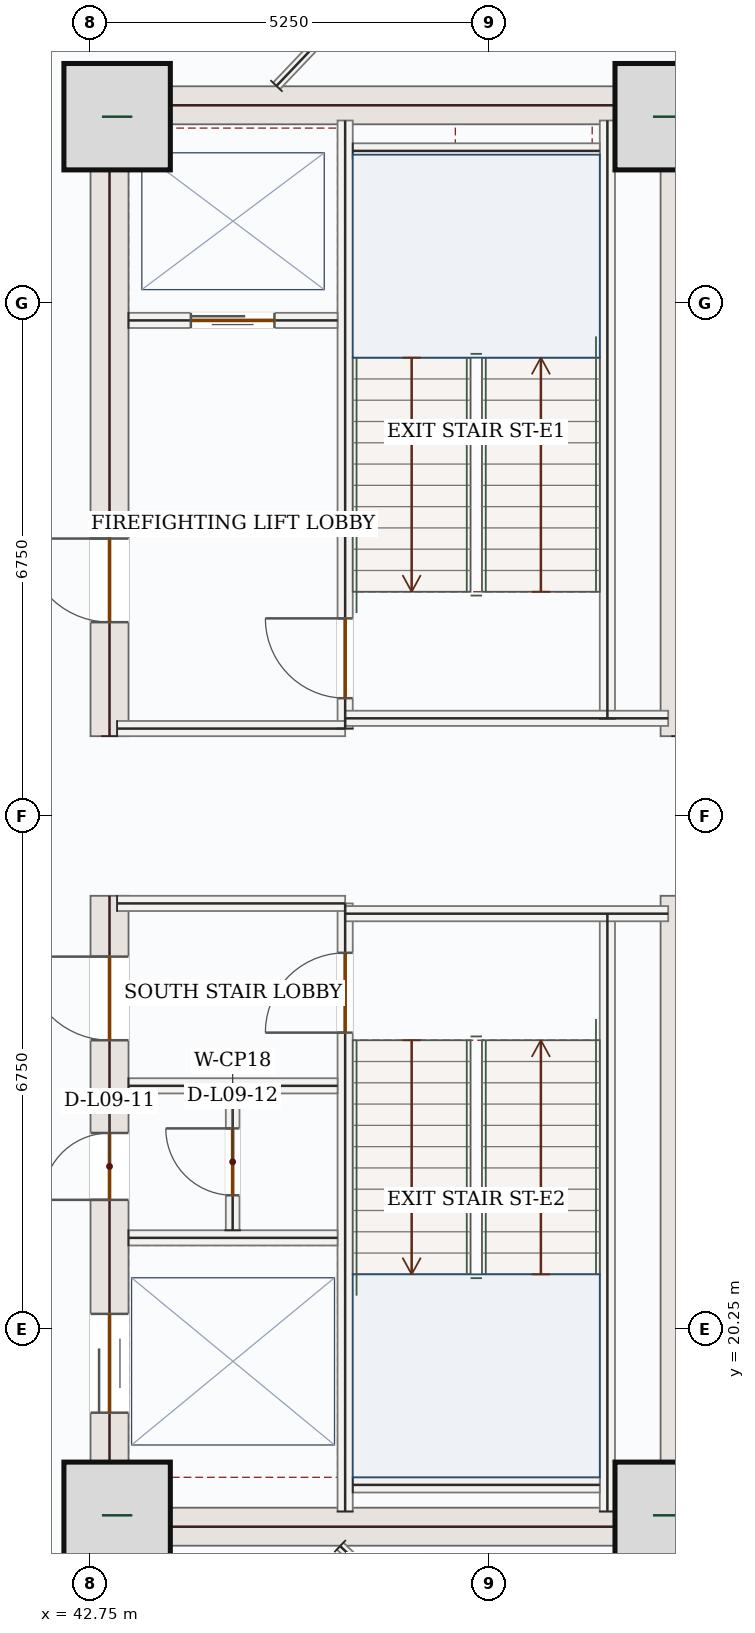
"""IFC4 building model, lengths in metres.
Left out: names, types, materials, properties, quantities, classifications, styles, units other than length and angle.
Written with IfcOpenShell. Run it as: python <this file> out.ifc"""

import sys

from ifc_helpers import new_model, si_unit, direction, frame, frame_2d, origin, origin_2d, place, context, subcontext, project, spatial, rectangle, extrude, source, transform, mapped, element, fill, save


model = new_model("IFC4")
c1 = context("Model", 3, precision=1e-05, world=origin(), true_north=direction((0.0, 1.0)))
c2 = subcontext(c1, "Body", "Model", "MODEL_VIEW")
j1 = project(units=[si_unit("LENGTHUNIT", "METRE"), si_unit("PLANEANGLEUNIT", "RADIAN")], contexts=[c1])
p1 = place(None, origin())
s1 = spatial("IfcSite", under=j1, at=p1, CompositionType="ELEMENT")
p2 = place(p1, origin())
s2 = spatial("IfcBuilding", under=s1, at=p2, CompositionType="ELEMENT")
p3 = place(p2, frame((0.0, 0.0, 45.9)))
s3 = spatial("IfcBuildingStorey", under=s2, at=p3, CompositionType="ELEMENT", Elevation=45.9)
p4 = place(p3, frame((43.0, 17.4, 0.0), z_axis=(0.0, 0.0, 1.0), x_axis=(0.0, 1.0, 0.0)))
e1 = element("IfcWall", 1, at=p4, inside=s3, PredefinedType="SHEAR", context=c2, shape_type="SweptSolid", body=[
    extrude(rectangle(XDim=8.55, YDim=0.5, at=frame_2d((4.275, 0.0))), origin(), (0.0, 0.0, 1.0), 3.95),
])
p5 = place(p4, frame((6.65, 0.0, 0.0)))
e2 = element("IfcOpeningElement", 2, at=p5, cuts=e1, PredefinedType="OPENING", context=c2, shape_type="SweptSolid", body=[
    extrude(rectangle(XDim=1.1, YDim=2.2, at=frame_2d((0.55, 1.1))), frame((0.0, 0.26, 0.0), z_axis=(0.0, -1.0, 0.0), x_axis=(1.0, 0.0, 0.0)), (0.0, 0.0, 1.0), 0.52),
])
p6 = place(p4, frame((1.75, 0.0, 0.0)))
e3 = element("IfcOpeningElement", 3, at=p6, cuts=e1, PredefinedType="OPENING", context=c2, shape_type="SweptSolid", body=[
    extrude(rectangle(XDim=1.3, YDim=2.2, at=frame_2d((0.65, 1.1))), frame((0.0, 0.26, 0.0), z_axis=(0.0, -1.0, 0.0), x_axis=(1.0, 0.0, 0.0)), (0.0, 0.0, 1.0), 0.52),
])
p7 = place(p4, frame((4.55, 0.0, 0.0)))
e4 = element("IfcOpeningElement", 4, at=p7, cuts=e1, PredefinedType="OPENING", context=c2, shape_type="SweptSolid", body=[
    extrude(rectangle(XDim=0.88, YDim=2.1, at=frame_2d((0.44, 1.05))), frame((0.0, 0.26, 0.0), z_axis=(0.0, -1.0, 0.0), x_axis=(1.0, 0.0, 0.0)), (0.0, 0.0, 1.0), 0.52),
])
p8 = place(p3, frame((43.0, 28.05, 0.0), z_axis=(0.0, 0.0, 1.0), x_axis=(0.0, 1.0, 0.0)))
e5 = element("IfcWall", 5, at=p8, inside=s3, PredefinedType="SHEAR", context=c2, shape_type="SweptSolid", body=[
    extrude(rectangle(XDim=8.55, YDim=0.5, at=frame_2d((4.275, 0.0))), origin(), (0.0, 0.0, 1.0), 3.95),
])
p9 = place(p8, frame((1.5, 0.0, 0.0)))
e6 = element("IfcOpeningElement", 6, at=p9, cuts=e5, PredefinedType="OPENING", context=c2, shape_type="SweptSolid", body=[
    extrude(rectangle(XDim=1.1, YDim=2.2, at=frame_2d((0.55, 1.1))), frame((0.0, 0.26, 0.0), z_axis=(0.0, -1.0, 0.0), x_axis=(1.0, 0.0, 0.0)), (0.0, 0.0, 1.0), 0.52),
])
m1 = source(origin(), c2, "Body", "SweptSolid", [
    extrude(rectangle(XDim=8.55, YDim=0.5, at=frame_2d((4.275, 0.0))), origin(), (0.0, 0.0, 1.0), 3.95),
])
for number, where, z_axis, x_axis in (
    (7, (50.5, 17.4, 0.0), (0.0, 0.0, 1.0), (0.0, 1.0, 0.0)),
    (8, (50.5, 28.05, 0.0), (0.0, 0.0, 1.0), (0.0, 1.0, 0.0)),
):
    element("IfcWall", number, at=place(p3, frame(where, z_axis=z_axis, x_axis=x_axis)), inside=s3, PredefinedType="SHEAR", context=c2, shape_type="MappedRepresentation", body=[
        mapped(m1, transform((0.0, 0.0, 0.0), x_axis=(1.0, 0.0, 0.0), y_axis=(0.0, 1.0, 0.0), z_axis=(0.0, 0.0, 1.0), scale=1.0)),
    ])
m2 = source(origin(), c2, "Body", "SweptSolid", [
    extrude(rectangle(XDim=7.0, YDim=0.5, at=frame_2d((3.5, 0.0))), origin(), (0.0, 0.0, 1.0), 3.95),
])
for number, where, z_axis, x_axis in (
    (9, (43.25, 17.65, 0.0), (0.0, 0.0, 1.0), (1.0, 0.0, 0.0)),
    (10, (43.25, 36.35, 0.0), (0.0, 0.0, 1.0), (1.0, 0.0, 0.0)),
):
    element("IfcWall", number, at=place(p3, frame(where, z_axis=z_axis, x_axis=x_axis)), inside=s3, PredefinedType="SHEAR", context=c2, shape_type="MappedRepresentation", body=[
        mapped(m2, transform((0.0, 0.0, 0.0), x_axis=(1.0, 0.0, 0.0), y_axis=(0.0, 1.0, 0.0), z_axis=(0.0, 0.0, 1.0), scale=1.0)),
    ])
m3 = source(origin(), c2, "Body", "SweptSolid", [
    extrude(rectangle(XDim=1.4, YDim=1.4, at=origin_2d()), origin(), (0.0, 0.0, 1.0), 4.2),
])
for number, where, z_axis, x_axis in (
    (11, (43.1, 17.8, 0.0), (0.0, 0.0, 1.0), (1.0, 0.0, 0.0)),
    (12, (50.35, 17.8, 0.0), (0.0, 0.0, 1.0), (1.0, 0.0, 0.0)),
    (13, (43.1, 36.2, 0.0), (0.0, 0.0, 1.0), (1.0, 0.0, 0.0)),
    (14, (50.35, 36.2, 0.0), (0.0, 0.0, 1.0), (1.0, 0.0, 0.0)),
):
    element("IfcColumn", number, at=place(p3, frame(where, z_axis=z_axis, x_axis=x_axis)), inside=s3, PredefinedType="COLUMN", context=c2, shape_type="MappedRepresentation", body=[
        mapped(m3, transform((0.0, 0.0, 0.0), x_axis=(1.0, 0.0, 0.0), y_axis=(0.0, 1.0, 0.0), z_axis=(0.0, 0.0, 1.0), scale=1.0)),
    ])
p10 = place(p3, frame((53.06, 18.458, 0.0), z_axis=(0.0, 0.0, 1.0), x_axis=(-0.707106781187, -0.707106781187, 0.0)))
e15 = element("IfcWall", 15, at=p10, inside=s3, PredefinedType="SOLIDWALL", context=c2, shape_type="SweptSolid", body=[
    extrude(rectangle(XDim=5.258, YDim=0.32, at=frame_2d((2.629, 0.0))), origin(), (0.0, 0.0, 1.0), 3.95),
])
p11 = place(p10, frame((1.429, 0.0, 0.85)))
e16 = element("IfcOpeningElement", 16, at=p11, cuts=e15, PredefinedType="OPENING", context=c2, shape_type="SweptSolid", body=[
    extrude(rectangle(XDim=2.4, YDim=1.8, at=frame_2d((1.2, 0.9))), frame((0.0, 0.17, 0.0), z_axis=(0.0, -1.0, 0.0), x_axis=(1.0, 0.0, 0.0)), (0.0, 0.0, 1.0), 0.34),
])
m4 = source(origin(), c2, "Body", "SweptSolid", [
    extrude(rectangle(XDim=5.258, YDim=0.32, at=frame_2d((2.629, 0.0))), origin(), (0.0, 0.0, 1.0), 3.95),
])
p12 = place(p3, frame((49.342, 39.26, 0.0), z_axis=(0.0, 0.0, 1.0), x_axis=(0.707106781187, -0.707106781187, 0.0)))
e17 = element("IfcWall", 17, at=p12, inside=s3, PredefinedType="SOLIDWALL", context=c2, shape_type="MappedRepresentation", body=[
    mapped(m4, transform((0.0, 0.0, 0.0), x_axis=(1.0, 0.0, 0.0), y_axis=(0.0, 1.0, 0.0), z_axis=(0.0, 0.0, 1.0), scale=1.0)),
])
m5 = source(origin(), c2, "Body", "SweptSolid", [
    extrude(rectangle(XDim=7.87, YDim=0.2, at=frame_2d((3.935, 0.0))), origin(), (0.0, 0.0, 1.0), 3.95),
])
for number, where, z_axis, x_axis in (
    (18, (49.55, 17.85, 0.0), (0.0, 0.0, 1.0), (0.0, 1.0, 0.0)),
    (19, (49.55, 28.28, 0.0), (0.0, 0.0, 1.0), (0.0, 1.0, 0.0)),
):
    element("IfcWall", number, at=place(p3, frame(where, z_axis=z_axis, x_axis=x_axis)), inside=s3, PredefinedType="SOLIDWALL", context=c2, shape_type="MappedRepresentation", body=[
        mapped(m5, transform((0.0, 0.0, 0.0), x_axis=(1.0, 0.0, 0.0), y_axis=(0.0, 1.0, 0.0), z_axis=(0.0, 0.0, 1.0), scale=1.0)),
    ])
p13 = place(p3, frame((46.1, 17.85, 0.0), z_axis=(0.0, 0.0, 1.0), x_axis=(0.0, 1.0, 0.0)))
e20 = element("IfcWall", 20, at=p13, inside=s3, PredefinedType="SOLIDWALL", context=c2, shape_type="SweptSolid", body=[
    extrude(rectangle(XDim=8.0, YDim=0.2, at=frame_2d((4.0, 0.0))), origin(), (0.0, 0.0, 1.0), 3.95),
])
p14 = place(p13, frame((6.3, 0.0, 0.0)))
e21 = element("IfcOpeningElement", 21, at=p14, cuts=e20, PredefinedType="OPENING", context=c2, shape_type="SweptSolid", body=[
    extrude(rectangle(XDim=1.05, YDim=2.15, at=frame_2d((0.525, 1.075))), frame((0.0, 0.11, 0.0), z_axis=(0.0, -1.0, 0.0), x_axis=(1.0, 0.0, 0.0)), (0.0, 0.0, 1.0), 0.22),
])
p15 = place(p3, frame((46.1, 28.15, 0.0), z_axis=(0.0, 0.0, 1.0), x_axis=(0.0, 1.0, 0.0)))
e22 = element("IfcWall", 22, at=p15, inside=s3, PredefinedType="SOLIDWALL", context=c2, shape_type="SweptSolid", body=[
    extrude(rectangle(XDim=8.0, YDim=0.2, at=frame_2d((4.0, 0.0))), origin(), (0.0, 0.0, 1.0), 3.95),
])
p16 = place(p15, frame((0.4, 0.0, 0.0)))
e23 = element("IfcOpeningElement", 23, at=p16, cuts=e22, PredefinedType="OPENING", context=c2, shape_type="SweptSolid", body=[
    extrude(rectangle(XDim=1.05, YDim=2.15, at=frame_2d((0.525, 1.075))), frame((0.0, 0.11, 0.0), z_axis=(0.0, -1.0, 0.0), x_axis=(1.0, 0.0, 0.0)), (0.0, 0.0, 1.0), 0.22),
])
m6 = source(origin(), c2, "Body", "SweptSolid", [
    extrude(rectangle(XDim=3.0, YDim=0.2, at=frame_2d((1.5, 0.0))), origin(), (0.0, 0.0, 1.0), 3.95),
])
p17 = place(p3, frame((43.1, 25.85, 0.0), z_axis=(0.0, 0.0, 1.0), x_axis=(1.0, 0.0, 0.0)))
e24 = element("IfcWall", 24, at=p17, inside=s3, PredefinedType="SOLIDWALL", context=c2, shape_type="MappedRepresentation", body=[
    mapped(m6, transform((0.0, 0.0, 0.0), x_axis=(1.0, 0.0, 0.0), y_axis=(0.0, 1.0, 0.0), z_axis=(0.0, 0.0, 1.0), scale=1.0)),
])
m7 = source(origin(), c2, "Body", "SweptSolid", [
    extrude(rectangle(XDim=4.25, YDim=0.2, at=frame_2d((2.125, 0.0))), origin(), (0.0, 0.0, 1.0), 3.95),
])
p18 = place(p3, frame((46.1, 25.715, 0.0), z_axis=(0.0, 0.0, 1.0), x_axis=(1.0, 0.0, 0.0)))
e25 = element("IfcWall", 25, at=p18, inside=s3, PredefinedType="SOLIDWALL", context=c2, shape_type="MappedRepresentation", body=[
    mapped(m7, transform((0.0, 0.0, 0.0), x_axis=(1.0, 0.0, 0.0), y_axis=(0.0, 1.0, 0.0), z_axis=(0.0, 0.0, 1.0), scale=1.0)),
])
p19 = place(p3, frame((43.1, 28.15, 0.0), z_axis=(0.0, 0.0, 1.0), x_axis=(1.0, 0.0, 0.0)))
e26 = element("IfcWall", 26, at=p19, inside=s3, PredefinedType="SOLIDWALL", context=c2, shape_type="MappedRepresentation", body=[
    mapped(m6, transform((0.0, 0.0, 0.0), x_axis=(1.0, 0.0, 0.0), y_axis=(0.0, 1.0, 0.0), z_axis=(0.0, 0.0, 1.0), scale=1.0)),
])
p20 = place(p3, frame((46.1, 28.285, 0.0), z_axis=(0.0, 0.0, 1.0), x_axis=(1.0, 0.0, 0.0)))
e27 = element("IfcWall", 27, at=p20, inside=s3, PredefinedType="SOLIDWALL", context=c2, shape_type="MappedRepresentation", body=[
    mapped(m7, transform((0.0, 0.0, 0.0), x_axis=(1.0, 0.0, 0.0), y_axis=(0.0, 1.0, 0.0), z_axis=(0.0, 0.0, 1.0), scale=1.0)),
])
m8 = source(origin(), c2, "Body", "SweptSolid", [
    extrude(rectangle(XDim=3.25, YDim=0.2, at=frame_2d((1.625, 0.0))), origin(), (0.0, 0.0, 1.0), 3.95),
])
for number, where, z_axis, x_axis in (
    (28, (46.2, 35.75, 0.0), (0.0, 0.0, 1.0), (1.0, 0.0, 0.0)),
    (29, (46.2, 18.2, 0.0), (0.0, 0.0, 1.0), (1.0, 0.0, 0.0)),
):
    element("IfcWall", number, at=place(p3, frame(where, z_axis=z_axis, x_axis=x_axis)), inside=s3, PredefinedType="SOLIDWALL", context=c2, shape_type="MappedRepresentation", body=[
        mapped(m8, transform((0.0, 0.0, 0.0), x_axis=(1.0, 0.0, 0.0), y_axis=(0.0, 1.0, 0.0), z_axis=(0.0, 0.0, 1.0), scale=1.0)),
    ])
p21 = place(p3, frame((43.25, 33.52, 0.0), z_axis=(0.0, 0.0, 1.0), x_axis=(1.0, 0.0, 0.0)))
e30 = element("IfcWall", 30, at=p21, inside=s3, PredefinedType="SOLIDWALL", context=c2, shape_type="SweptSolid", body=[
    extrude(rectangle(XDim=2.75, YDim=0.2, at=frame_2d((1.375, 0.0))), origin(), (0.0, 0.0, 1.0), 3.95),
])
p22 = place(p21, frame((0.82, 0.0, 0.0)))
e31 = element("IfcOpeningElement", 31, at=p22, cuts=e30, PredefinedType="OPENING", context=c2, shape_type="SweptSolid", body=[
    extrude(rectangle(XDim=1.1, YDim=2.15, at=frame_2d((0.55, 1.075))), frame((0.0, 0.11, 0.0), z_axis=(0.0, -1.0, 0.0), x_axis=(1.0, 0.0, 0.0)), (0.0, 0.0, 1.0), 0.22),
])
m9 = source(origin(), c2, "Body", "SweptSolid", [
    extrude(rectangle(XDim=2.75, YDim=0.2, at=frame_2d((1.375, 0.0))), origin(), (0.0, 0.0, 1.0), 3.95),
])
for number, where, z_axis, x_axis in (
    (32, (43.25, 23.45, 0.0), (0.0, 0.0, 1.0), (1.0, 0.0, 0.0)),
    (33, (43.25, 21.45, 0.0), (0.0, 0.0, 1.0), (1.0, 0.0, 0.0)),
):
    element("IfcWall", number, at=place(p3, frame(where, z_axis=z_axis, x_axis=x_axis)), inside=s3, PredefinedType="SOLIDWALL", context=c2, shape_type="MappedRepresentation", body=[
        mapped(m9, transform((0.0, 0.0, 0.0), x_axis=(1.0, 0.0, 0.0), y_axis=(0.0, 1.0, 0.0), z_axis=(0.0, 0.0, 1.0), scale=1.0)),
    ])
p23 = place(p3, frame((44.62, 21.55, 0.0), z_axis=(0.0, 0.0, 1.0), x_axis=(0.0, 1.0, 0.0)))
e34 = element("IfcWall", 34, at=p23, inside=s3, PredefinedType="PARTITIONING", context=c2, shape_type="SweptSolid", body=[
    extrude(rectangle(XDim=1.8, YDim=0.18, at=frame_2d((0.9, 0.0))), origin(), (0.0, 0.0, 1.0), 3.95),
])
p24 = place(p23, frame((0.46, 0.0, 0.0)))
e35 = element("IfcOpeningElement", 35, at=p24, cuts=e34, PredefinedType="OPENING", context=c2, shape_type="SweptSolid", body=[
    extrude(rectangle(XDim=0.88, YDim=2.1, at=frame_2d((0.44, 1.05))), frame((0.0, 0.1, 0.0), z_axis=(0.0, -1.0, 0.0), x_axis=(1.0, 0.0, 0.0)), (0.0, 0.0, 1.0), 0.2),
])
m10 = source(origin(), c2, "Body", "SweptSolid", [
    extrude(rectangle(XDim=1.715, YDim=0.125, at=frame_2d((0.857, 0.0))), origin(), (0.0, 0.0, 1.0), 3.95),
])
p25 = place(p3, frame((46.034, 17.395, 0.0), z_axis=(0.0, 0.0, 1.0), x_axis=(0.724259786069, -0.689527201989, 0.0)))
e36 = element("IfcWall", 36, at=p25, inside=s3, PredefinedType="PARTITIONING", context=c2, shape_type="MappedRepresentation", body=[
    mapped(m10, transform((0.0, 0.0, 0.0), x_axis=(1.0, 0.0, 0.0), y_axis=(0.0, 1.0, 0.0), z_axis=(0.0, 0.0, 1.0), scale=1.0)),
])
m11 = source(origin(), c2, "Body", "SweptSolid", [
    extrude(rectangle(XDim=3.438, YDim=0.125, at=frame_2d((1.719, 0.0))), origin(), (0.0, 0.0, 1.0), 3.95),
])
p26 = place(p3, frame((45.197, 36.605, 0.0), z_axis=(0.0, 0.0, 1.0), x_axis=(0.689493786127, 0.724291597972, 0.0)))
e37 = element("IfcWall", 37, at=p26, inside=s3, PredefinedType="PARTITIONING", context=c2, shape_type="MappedRepresentation", body=[
    mapped(m11, transform((0.0, 0.0, 0.0), x_axis=(1.0, 0.0, 0.0), y_axis=(0.0, 1.0, 0.0), z_axis=(0.0, 0.0, 1.0), scale=1.0)),
])
m12 = source(origin(), c2, "Body", "SweptSolid", [
    extrude(rectangle(XDim=2.4, YDim=1.8, at=frame_2d((1.2, 0.9))), frame((0.0, 0.03, 0.0), z_axis=(0.0, -1.0, 0.0), x_axis=(1.0, 0.0, 0.0)), (0.0, 0.0, 1.0), 0.06),
])
p27 = place(p11, origin())
e38 = element("IfcWindow", 38, at=p27, inside=s3, PartitioningType="DOUBLE_PANEL_VERTICAL", PredefinedType="WINDOW", context=c2, shape_type="MappedRepresentation", body=[
    mapped(m12, transform((0.0, 0.0, 0.0), x_axis=(1.0, 0.0, 0.0), y_axis=(0.0, 1.0, 0.0), z_axis=(0.0, 0.0, 1.0), scale=1.0)),
])
fill(e16, e38)
m13 = source(origin(), c2, "Body", "SweptSolid", [
    extrude(rectangle(XDim=1.05, YDim=2.15, at=frame_2d((0.525, 1.075))), frame((0.0, 0.025, 0.0), z_axis=(0.0, -1.0, 0.0), x_axis=(1.0, 0.0, 0.0)), (0.0, 0.0, 1.0), 0.05),
])
p28 = place(p16, origin())
e39 = element("IfcDoor", 39, at=p28, inside=s3, OperationType="SINGLE_SWING_RIGHT", PredefinedType="DOOR", context=c2, shape_type="MappedRepresentation", body=[
    mapped(m13, transform((0.0, 0.0, 0.0), x_axis=(1.0, 0.0, 0.0), y_axis=(0.0, 1.0, 0.0), z_axis=(0.0, 0.0, 1.0), scale=1.0)),
])
fill(e23, e39)
p29 = place(p14, origin())
e40 = element("IfcDoor", 40, at=p29, inside=s3, OperationType="SINGLE_SWING_LEFT", PredefinedType="DOOR", context=c2, shape_type="MappedRepresentation", body=[
    mapped(m13, transform((0.0, 0.0, 0.0), x_axis=(1.0, 0.0, 0.0), y_axis=(0.0, 1.0, 0.0), z_axis=(0.0, 0.0, 1.0), scale=1.0)),
])
fill(e21, e40)
m14 = source(origin(), c2, "Body", "SweptSolid", [
    extrude(rectangle(XDim=1.1, YDim=2.15, at=frame_2d((0.55, 1.075))), frame((0.0, 0.025, 0.0), z_axis=(0.0, -1.0, 0.0), x_axis=(1.0, 0.0, 0.0)), (0.0, 0.0, 1.0), 0.05),
])
p30 = place(p22, origin())
e41 = element("IfcDoor", 41, at=p30, inside=s3, OperationType="DOUBLE_DOOR_SLIDING", PredefinedType="DOOR", context=c2, shape_type="MappedRepresentation", body=[
    mapped(m14, transform((0.0, 0.0, 0.0), x_axis=(1.0, 0.0, 0.0), y_axis=(0.0, 1.0, 0.0), z_axis=(0.0, 0.0, 1.0), scale=1.0)),
])
fill(e31, e41)
m15 = source(origin(), c2, "Body", "SweptSolid", [
    extrude(rectangle(XDim=1.1, YDim=2.2, at=frame_2d((0.55, 1.1))), frame((0.0, 0.025, 0.0), z_axis=(0.0, -1.0, 0.0), x_axis=(1.0, 0.0, 0.0)), (0.0, 0.0, 1.0), 0.05),
])
p31 = place(p9, origin())
e42 = element("IfcDoor", 42, at=p31, inside=s3, OperationType="SINGLE_SWING_RIGHT", PredefinedType="DOOR", context=c2, shape_type="MappedRepresentation", body=[
    mapped(m15, transform((0.0, 0.0, 0.0), x_axis=(1.0, 0.0, 0.0), y_axis=(0.0, 1.0, 0.0), z_axis=(0.0, 0.0, 1.0), scale=1.0)),
])
fill(e6, e42)
p32 = place(p5, origin())
e43 = element("IfcDoor", 43, at=p32, inside=s3, OperationType="SINGLE_SWING_RIGHT", PredefinedType="DOOR", context=c2, shape_type="MappedRepresentation", body=[
    mapped(m15, transform((0.0, 0.0, 0.0), x_axis=(1.0, 0.0, 0.0), y_axis=(0.0, 1.0, 0.0), z_axis=(0.0, 0.0, 1.0), scale=1.0)),
])
fill(e2, e43)
m16 = source(origin(), c2, "Body", "SweptSolid", [
    extrude(rectangle(XDim=1.3, YDim=2.2, at=frame_2d((0.65, 1.1))), frame((0.0, 0.025, 0.0), z_axis=(0.0, -1.0, 0.0), x_axis=(1.0, 0.0, 0.0)), (0.0, 0.0, 1.0), 0.05),
])
p33 = place(p6, origin())
e44 = element("IfcDoor", 44, at=p33, inside=s3, OperationType="DOUBLE_DOOR_SLIDING", PredefinedType="DOOR", context=c2, shape_type="MappedRepresentation", body=[
    mapped(m16, transform((0.0, 0.0, 0.0), x_axis=(1.0, 0.0, 0.0), y_axis=(0.0, 1.0, 0.0), z_axis=(0.0, 0.0, 1.0), scale=1.0)),
])
fill(e3, e44)
m17 = source(origin(), c2, "Body", "SweptSolid", [
    extrude(rectangle(XDim=0.88, YDim=2.1, at=frame_2d((0.44, 1.05))), frame((0.0, 0.025, 0.0), z_axis=(0.0, -1.0, 0.0), x_axis=(1.0, 0.0, 0.0)), (0.0, 0.0, 1.0), 0.05),
])
p34 = place(p7, origin())
e45 = element("IfcDoor", 45, at=p34, inside=s3, OperationType="SINGLE_SWING_LEFT", PredefinedType="DOOR", context=c2, shape_type="MappedRepresentation", body=[
    mapped(m17, transform((0.0, 0.0, 0.0), x_axis=(1.0, 0.0, 0.0), y_axis=(0.0, 1.0, 0.0), z_axis=(0.0, 0.0, 1.0), scale=1.0)),
])
fill(e4, e45)
p35 = place(p24, origin())
e46 = element("IfcDoor", 46, at=p35, inside=s3, OperationType="SINGLE_SWING_RIGHT", PredefinedType="DOOR", context=c2, shape_type="MappedRepresentation", body=[
    mapped(m17, transform((0.0, 0.0, 0.0), x_axis=(1.0, 0.0, 0.0), y_axis=(0.0, 1.0, 0.0), z_axis=(0.0, 0.0, 1.0), scale=1.0)),
])
fill(e35, e46)
save(model, sys.argv[1])
